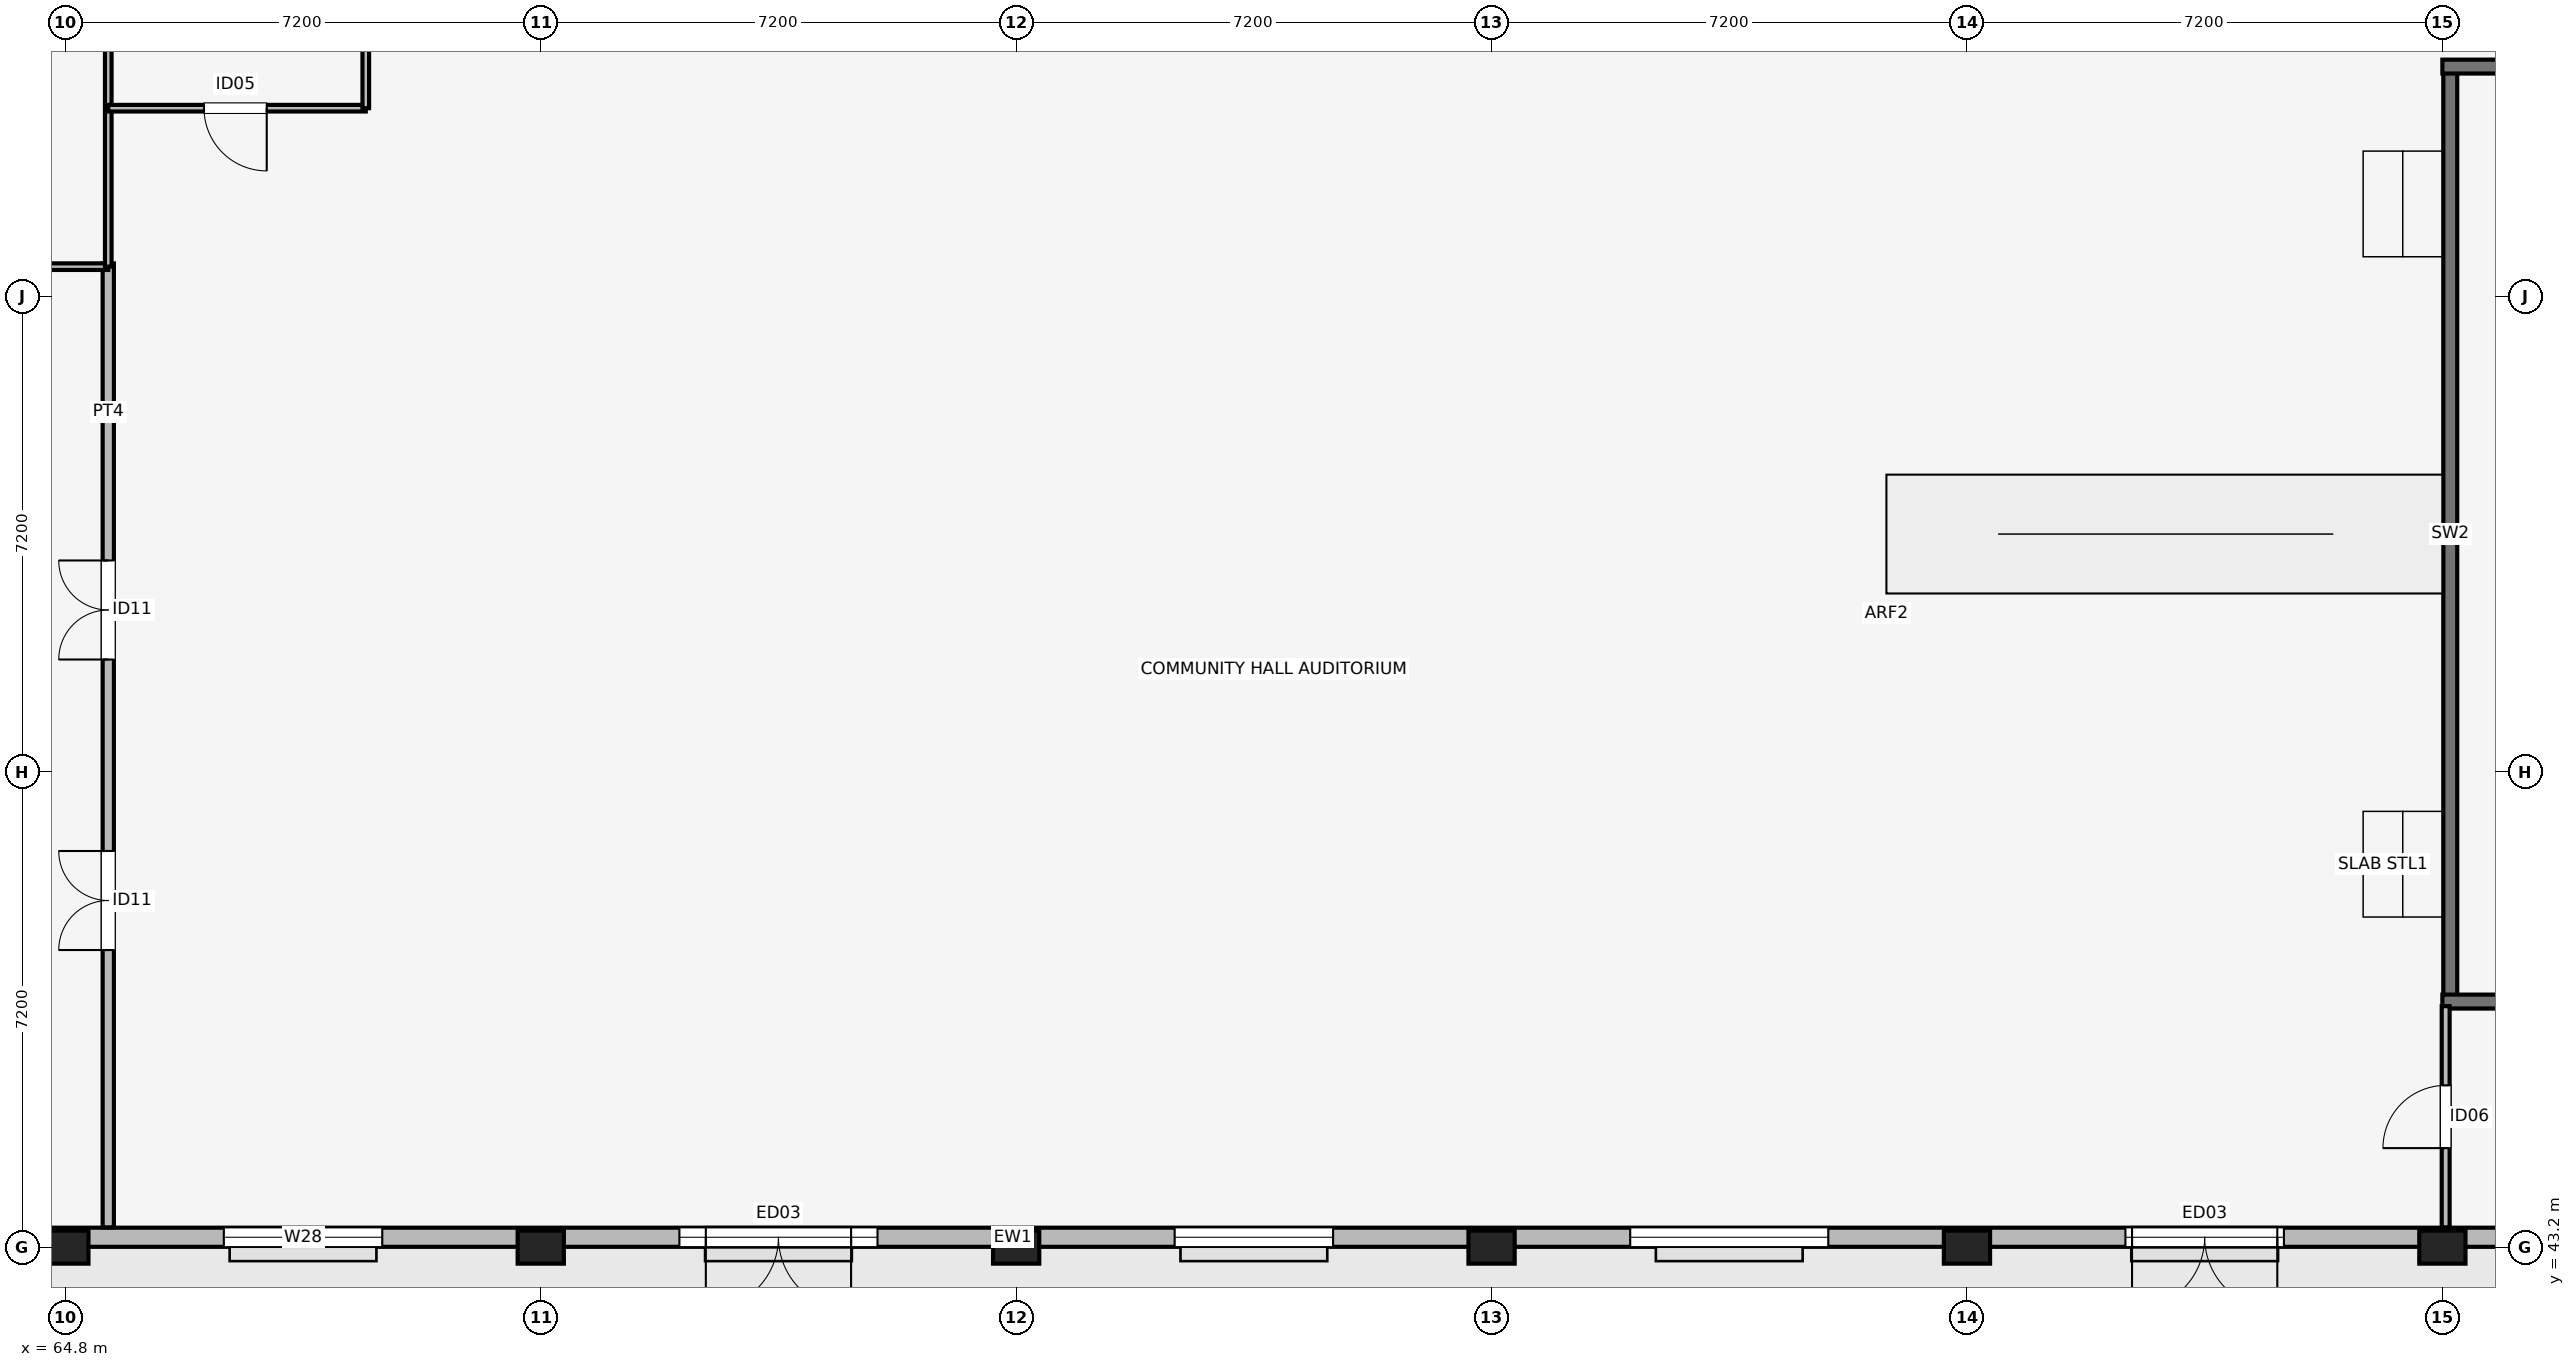
"""IFC4 building model, lengths in metres.
Left out: names, types, materials, properties, quantities, classifications, styles, units other than length and angle.
Written with IfcOpenShell. Run it as: python <this file> out.ifc"""

import sys

from ifc_helpers import new_model, si_unit, direction, frame, frame_2d, origin, origin_2d, place, context, subcontext, project, spatial, rectangle, extrude, element, fill, save


model = new_model("IFC4")
c1 = context("Model", 3, precision=1e-05, world=origin(), true_north=direction((0.0, 1.0)))
c2 = subcontext(c1, "Body", "Model", "MODEL_VIEW")
j1 = project(units=[si_unit("LENGTHUNIT", "METRE"), si_unit("PLANEANGLEUNIT", "RADIAN")], contexts=[c1])
p1 = place(None, origin())
s1 = spatial("IfcSite", under=j1, at=p1, CompositionType="ELEMENT")
p2 = place(p1, origin())
s2 = spatial("IfcBuilding", under=s1, at=p2, CompositionType="ELEMENT")
p3 = place(p2, origin())
s3 = spatial("IfcBuildingStorey", under=s2, at=p3, CompositionType="ELEMENT", Elevation=0.0)
p4 = place(p3, frame((100.92, 46.9, 0.0), z_axis=(0.0, 0.0, 1.0), x_axis=(0.0, 1.0, 0.0)))
e1 = element("IfcWall", 1, at=p4, inside=s3, PredefinedType="SHEAR", context=c2, shape_type="SweptSolid", body=[
    extrude(rectangle(XDim=14.2, YDim=0.21, at=frame_2d((7.1, 0.0))), origin(), (0.0, 0.0, 1.0), 0.26),
])
for number, where, z_axis, x_axis in (
    (2, (100.8, 46.92, 0.0), (0.0, 0.0, 1.0), (1.0, 0.0, 0.0)),
    (3, (100.8, 61.08, 0.0), (0.0, 0.0, 1.0), (1.0, 0.0, 0.0)),
):
    element("IfcWall", number, at=place(p3, frame(where, z_axis=z_axis, x_axis=x_axis)), inside=s3, PredefinedType="SHEAR", context=c2, shape_type="SweptSolid", body=[
        extrude(rectangle(XDim=6.92, YDim=0.21, at=frame_2d((3.46, 0.0))), origin(), (0.0, 0.0, 1.0), 0.26),
    ])
for number, where, z_axis, x_axis in (
    (4, (64.8, 43.2, 0.0), (0.0, 0.0, 1.0), (0.0, 1.0, 0.0)),
    (5, (72.0, 43.2, 0.0), (0.0, 0.0, 1.0), (0.0, 1.0, 0.0)),
    (6, (79.2, 43.2, 0.0), (0.0, 0.0, 1.0), (0.0, 1.0, 0.0)),
    (7, (86.4, 43.2, 0.0), (0.0, 0.0, 1.0), (0.0, 1.0, 0.0)),
    (8, (93.6, 43.2, 0.0), (0.0, 0.0, 1.0), (0.0, 1.0, 0.0)),
    (9, (100.8, 43.2, 0.0), (0.0, 0.0, 1.0), (0.0, 1.0, 0.0)),
):
    element("IfcColumn", number, at=place(p3, frame(where, z_axis=z_axis, x_axis=x_axis)), inside=s3, PredefinedType="COLUMN", context=c2, shape_type="SweptSolid", body=[
        extrude(rectangle(XDim=0.5, YDim=0.7, at=origin_2d()), origin(), (0.0, 0.0, 1.0), 4.8),
    ])
p5 = place(p3, frame((59.0, 43.35, 0.0), z_axis=(0.0, 0.0, 1.0), x_axis=(1.0, 0.0, 0.0)))
e10 = element("IfcWall", 10, at=p5, inside=s3, PredefinedType="SOLIDWALL", context=c2, shape_type="SweptSolid", body=[
    extrude(rectangle(XDim=47.6, YDim=0.29, at=frame_2d((23.8, 0.0))), origin(), (0.0, 0.0, 1.0), 3.88),
])
p6 = place(p5, frame((3.3, 0.0, 0.0), z_axis=(0.0, 0.0, 1.0), x_axis=(-1.0, 0.0, 0.0)))
e11 = element("IfcOpeningElement", 11, at=p6, cuts=e10, PredefinedType="OPENING", context=c2, shape_type="SweptSolid", body=[
    extrude(rectangle(XDim=2.2, YDim=2.6, at=frame_2d((1.1, 1.3))), frame((0.0, 0.155, 0.0), z_axis=(0.0, -1.0, 0.0), x_axis=(1.0, 0.0, 0.0)), (0.0, 0.0, 1.0), 0.31),
])
p7 = place(p5, frame((17.7, 0.0, 0.0), z_axis=(0.0, 0.0, 1.0), x_axis=(-1.0, 0.0, 0.0)))
e12 = element("IfcOpeningElement", 12, at=p7, cuts=e10, PredefinedType="OPENING", context=c2, shape_type="SweptSolid", body=[
    extrude(rectangle(XDim=2.2, YDim=2.6, at=frame_2d((1.1, 1.3))), frame((0.0, 0.155, 0.0), z_axis=(0.0, -1.0, 0.0), x_axis=(1.0, 0.0, 0.0)), (0.0, 0.0, 1.0), 0.31),
])
p8 = place(p5, frame((39.3, 0.0, 0.0), z_axis=(0.0, 0.0, 1.0), x_axis=(-1.0, 0.0, 0.0)))
e13 = element("IfcOpeningElement", 13, at=p8, cuts=e10, PredefinedType="OPENING", context=c2, shape_type="SweptSolid", body=[
    extrude(rectangle(XDim=2.2, YDim=2.6, at=frame_2d((1.1, 1.3))), frame((0.0, 0.155, 0.0), z_axis=(0.0, -1.0, 0.0), x_axis=(1.0, 0.0, 0.0)), (0.0, 0.0, 1.0), 0.31),
])
p9 = place(p5, frame((0.7, 0.0, 2.85)))
e14 = element("IfcOpeningElement", 14, at=p9, cuts=e10, PredefinedType="OPENING", context=c2, shape_type="SweptSolid", body=[
    extrude(rectangle(XDim=3.0, YDim=0.9, at=frame_2d((1.5, 0.45))), frame((0.0, 0.155, 0.0), z_axis=(0.0, -1.0, 0.0), x_axis=(1.0, 0.0, 0.0)), (0.0, 0.0, 1.0), 0.31),
])
p10 = place(p5, frame((8.2, 0.0, 2.85)))
e15 = element("IfcOpeningElement", 15, at=p10, cuts=e10, PredefinedType="OPENING", context=c2, shape_type="SweptSolid", body=[
    extrude(rectangle(XDim=2.4, YDim=0.9, at=frame_2d((1.2, 0.45))), frame((0.0, 0.155, 0.0), z_axis=(0.0, -1.0, 0.0), x_axis=(1.0, 0.0, 0.0)), (0.0, 0.0, 1.0), 0.31),
])
p11 = place(p5, frame((15.1, 0.0, 2.85)))
e16 = element("IfcOpeningElement", 16, at=p11, cuts=e10, PredefinedType="OPENING", context=c2, shape_type="SweptSolid", body=[
    extrude(rectangle(XDim=3.0, YDim=0.9, at=frame_2d((1.5, 0.45))), frame((0.0, 0.155, 0.0), z_axis=(0.0, -1.0, 0.0), x_axis=(1.0, 0.0, 0.0)), (0.0, 0.0, 1.0), 0.31),
])
p12 = place(p5, frame((22.6, 0.0, 2.85)))
e17 = element("IfcOpeningElement", 17, at=p12, cuts=e10, PredefinedType="OPENING", context=c2, shape_type="SweptSolid", body=[
    extrude(rectangle(XDim=2.4, YDim=0.9, at=frame_2d((1.2, 0.45))), frame((0.0, 0.155, 0.0), z_axis=(0.0, -1.0, 0.0), x_axis=(1.0, 0.0, 0.0)), (0.0, 0.0, 1.0), 0.31),
])
p13 = place(p5, frame((29.5, 0.0, 2.85)))
e18 = element("IfcOpeningElement", 18, at=p13, cuts=e10, PredefinedType="OPENING", context=c2, shape_type="SweptSolid", body=[
    extrude(rectangle(XDim=3.0, YDim=0.9, at=frame_2d((1.5, 0.45))), frame((0.0, 0.155, 0.0), z_axis=(0.0, -1.0, 0.0), x_axis=(1.0, 0.0, 0.0)), (0.0, 0.0, 1.0), 0.31),
])
p14 = place(p5, frame((37.0, 0.0, 2.85)))
e19 = element("IfcOpeningElement", 19, at=p14, cuts=e10, PredefinedType="OPENING", context=c2, shape_type="SweptSolid", body=[
    extrude(rectangle(XDim=2.4, YDim=0.9, at=frame_2d((1.2, 0.45))), frame((0.0, 0.155, 0.0), z_axis=(0.0, -1.0, 0.0), x_axis=(1.0, 0.0, 0.0)), (0.0, 0.0, 1.0), 0.31),
])
p15 = place(p5, frame((43.9, 0.0, 2.85)))
e20 = element("IfcOpeningElement", 20, at=p15, cuts=e10, PredefinedType="OPENING", context=c2, shape_type="SweptSolid", body=[
    extrude(rectangle(XDim=3.0, YDim=0.9, at=frame_2d((1.5, 0.45))), frame((0.0, 0.155, 0.0), z_axis=(0.0, -1.0, 0.0), x_axis=(1.0, 0.0, 0.0)), (0.0, 0.0, 1.0), 0.31),
])
p16 = place(p3, frame((65.45, 43.5, 0.0), z_axis=(0.0, 0.0, 1.0), x_axis=(0.0, 1.0, 0.0)))
e21 = element("IfcWall", 21, at=p16, inside=s3, PredefinedType="PARTITIONING", context=c2, shape_type="SweptSolid", body=[
    extrude(rectangle(XDim=14.6, YDim=0.17, at=frame_2d((7.3, 0.0))), origin(), (0.0, 0.0, 1.0), 3.8),
])
p17 = place(p16, frame((4.2, 0.0, 0.0)))
e22 = element("IfcOpeningElement", 22, at=p17, cuts=e21, PredefinedType="OPENING", context=c2, shape_type="SweptSolid", body=[
    extrude(rectangle(XDim=1.5, YDim=2.28, at=frame_2d((0.75, 1.14))), frame((0.0, 0.095, 0.0), z_axis=(0.0, -1.0, 0.0), x_axis=(1.0, 0.0, 0.0)), (0.0, 0.0, 1.0), 0.19),
])
p18 = place(p16, frame((8.6, 0.0, 0.0)))
e23 = element("IfcOpeningElement", 23, at=p18, cuts=e21, PredefinedType="OPENING", context=c2, shape_type="SweptSolid", body=[
    extrude(rectangle(XDim=1.5, YDim=2.28, at=frame_2d((0.75, 1.14))), frame((0.0, 0.095, 0.0), z_axis=(0.0, -1.0, 0.0), x_axis=(1.0, 0.0, 0.0)), (0.0, 0.0, 1.0), 0.19),
])
p19 = place(p3, frame((57.9, 58.05, 0.0), z_axis=(0.0, 0.0, 1.0), x_axis=(1.0, 0.0, 0.0)))
e24 = element("IfcWall", 24, at=p19, inside=s3, PredefinedType="PARTITIONING", context=c2, shape_type="SweptSolid", body=[
    extrude(rectangle(XDim=7.55, YDim=0.1, at=frame_2d((3.775, 0.0))), origin(), (0.0, 0.0, 1.0), 3.8),
])
p20 = place(p19, frame((2.27, 0.0, 0.0), z_axis=(0.0, 0.0, 1.0), x_axis=(-1.0, 0.0, 0.0)))
e25 = element("IfcOpeningElement", 25, at=p20, cuts=e24, PredefinedType="OPENING", context=c2, shape_type="SweptSolid", body=[
    extrude(rectangle(XDim=0.92, YDim=2.12, at=frame_2d((0.46, 1.06))), frame((0.0, 0.06, 0.0), z_axis=(0.0, -1.0, 0.0), x_axis=(1.0, 0.0, 0.0)), (0.0, 0.0, 1.0), 0.12),
])
p21 = place(p19, frame((5.05, 0.0, 0.0)))
e26 = element("IfcOpeningElement", 26, at=p21, cuts=e24, PredefinedType="OPENING", context=c2, shape_type="SweptSolid", body=[
    extrude(rectangle(XDim=0.92, YDim=2.12, at=frame_2d((0.46, 1.06))), frame((0.0, 0.06, 0.0), z_axis=(0.0, -1.0, 0.0), x_axis=(1.0, 0.0, 0.0)), (0.0, 0.0, 1.0), 0.12),
])
p22 = place(p3, frame((65.45, 58.05, 0.0), z_axis=(0.0, 0.0, 1.0), x_axis=(0.0, 1.0, 0.0)))
e27 = element("IfcWall", 27, at=p22, inside=s3, PredefinedType="PARTITIONING", context=c2, shape_type="SweptSolid", body=[
    extrude(rectangle(XDim=6.45, YDim=0.1, at=frame_2d((3.225, 0.0))), origin(), (0.0, 0.0, 1.0), 3.8),
])
p23 = place(p3, frame((65.45, 60.45, 0.0), z_axis=(0.0, 0.0, 1.0), x_axis=(1.0, 0.0, 0.0)))
e28 = element("IfcWall", 28, at=p23, inside=s3, PredefinedType="PARTITIONING", context=c2, shape_type="SweptSolid", body=[
    extrude(rectangle(XDim=3.9, YDim=0.1, at=frame_2d((1.95, 0.0))), origin(), (0.0, 0.0, 1.0), 3.8),
])
p24 = place(p23, frame((2.4, 0.0, 0.0), z_axis=(0.0, 0.0, 1.0), x_axis=(-1.0, 0.0, 0.0)))
e29 = element("IfcOpeningElement", 29, at=p24, cuts=e28, PredefinedType="OPENING", context=c2, shape_type="SweptSolid", body=[
    extrude(rectangle(XDim=0.95, YDim=2.12, at=frame_2d((0.475, 1.06))), frame((0.0, 0.06, 0.0), z_axis=(0.0, -1.0, 0.0), x_axis=(1.0, 0.0, 0.0)), (0.0, 0.0, 1.0), 0.12),
])
p25 = place(p3, frame((69.35, 60.45, 0.0), z_axis=(0.0, 0.0, 1.0), x_axis=(0.0, 1.0, 0.0)))
e30 = element("IfcWall", 30, at=p25, inside=s3, PredefinedType="PARTITIONING", context=c2, shape_type="SweptSolid", body=[
    extrude(rectangle(XDim=4.05, YDim=0.1, at=frame_2d((2.025, 0.0))), origin(), (0.0, 0.0, 1.0), 3.8),
])
p26 = place(p3, frame((100.85, 43.5, 0.0), z_axis=(0.0, 0.0, 1.0), x_axis=(0.0, 1.0, 0.0)))
e31 = element("IfcWall", 31, at=p26, inside=s3, PredefinedType="PARTITIONING", context=c2, shape_type="SweptSolid", body=[
    extrude(rectangle(XDim=3.35, YDim=0.12, at=frame_2d((1.675, 0.0))), origin(), (0.0, 0.0, 1.0), 3.8),
])
p27 = place(p26, frame((1.2, 0.0, 0.0)))
e32 = element("IfcOpeningElement", 32, at=p27, cuts=e31, PredefinedType="OPENING", context=c2, shape_type="SweptSolid", body=[
    extrude(rectangle(XDim=0.95, YDim=2.08, at=frame_2d((0.475, 1.04))), frame((0.0, 0.07, 0.0), z_axis=(0.0, -1.0, 0.0), x_axis=(1.0, 0.0, 0.0)), (0.0, 0.0, 1.0), 0.14),
])
p28 = place(p7, origin())
e33 = element("IfcDoor", 33, at=p28, inside=s3, OperationType="DOUBLE_DOOR_SINGLE_SWING", PredefinedType="DOOR", context=c2, shape_type="SweptSolid", body=[
    extrude(rectangle(XDim=2.2, YDim=2.6, at=frame_2d((1.1, 1.3))), frame((0.0, 0.025, 0.0), z_axis=(0.0, -1.0, 0.0), x_axis=(1.0, 0.0, 0.0)), (0.0, 0.0, 1.0), 0.05),
])
fill(e12, e33)
p29 = place(p8, origin())
e34 = element("IfcDoor", 34, at=p29, inside=s3, OperationType="DOUBLE_DOOR_SINGLE_SWING", PredefinedType="DOOR", context=c2, shape_type="SweptSolid", body=[
    extrude(rectangle(XDim=2.2, YDim=2.6, at=frame_2d((1.1, 1.3))), frame((0.0, 0.025, 0.0), z_axis=(0.0, -1.0, 0.0), x_axis=(1.0, 0.0, 0.0)), (0.0, 0.0, 1.0), 0.05),
])
fill(e13, e34)
p30 = place(p10, origin())
e35 = element("IfcWindow", 35, at=p30, inside=s3, PartitioningType="SINGLE_PANEL", PredefinedType="WINDOW", context=c2, shape_type="SweptSolid", body=[
    extrude(rectangle(XDim=2.4, YDim=0.9, at=frame_2d((1.2, 0.45))), frame((0.0, 0.03, 0.0), z_axis=(0.0, -1.0, 0.0), x_axis=(1.0, 0.0, 0.0)), (0.0, 0.0, 1.0), 0.06),
])
fill(e15, e35)
p31 = place(p11, origin())
e36 = element("IfcWindow", 36, at=p31, inside=s3, PartitioningType="SINGLE_PANEL", PredefinedType="WINDOW", context=c2, shape_type="SweptSolid", body=[
    extrude(rectangle(XDim=3.0, YDim=0.9, at=frame_2d((1.5, 0.45))), frame((0.0, 0.03, 0.0), z_axis=(0.0, -1.0, 0.0), x_axis=(1.0, 0.0, 0.0)), (0.0, 0.0, 1.0), 0.06),
])
fill(e16, e36)
p32 = place(p12, origin())
e37 = element("IfcWindow", 37, at=p32, inside=s3, PartitioningType="SINGLE_PANEL", PredefinedType="WINDOW", context=c2, shape_type="SweptSolid", body=[
    extrude(rectangle(XDim=2.4, YDim=0.9, at=frame_2d((1.2, 0.45))), frame((0.0, 0.03, 0.0), z_axis=(0.0, -1.0, 0.0), x_axis=(1.0, 0.0, 0.0)), (0.0, 0.0, 1.0), 0.06),
])
fill(e17, e37)
p33 = place(p13, origin())
e38 = element("IfcWindow", 38, at=p33, inside=s3, PartitioningType="SINGLE_PANEL", PredefinedType="WINDOW", context=c2, shape_type="SweptSolid", body=[
    extrude(rectangle(XDim=3.0, YDim=0.9, at=frame_2d((1.5, 0.45))), frame((0.0, 0.03, 0.0), z_axis=(0.0, -1.0, 0.0), x_axis=(1.0, 0.0, 0.0)), (0.0, 0.0, 1.0), 0.06),
])
fill(e18, e38)
p34 = place(p14, origin())
e39 = element("IfcWindow", 39, at=p34, inside=s3, PartitioningType="SINGLE_PANEL", PredefinedType="WINDOW", context=c2, shape_type="SweptSolid", body=[
    extrude(rectangle(XDim=2.4, YDim=0.9, at=frame_2d((1.2, 0.45))), frame((0.0, 0.03, 0.0), z_axis=(0.0, -1.0, 0.0), x_axis=(1.0, 0.0, 0.0)), (0.0, 0.0, 1.0), 0.06),
])
fill(e19, e39)
p35 = place(p17, origin())
e40 = element("IfcDoor", 40, at=p35, inside=s3, OperationType="DOUBLE_DOOR_SINGLE_SWING", PredefinedType="DOOR", context=c2, shape_type="SweptSolid", body=[
    extrude(rectangle(XDim=1.5, YDim=2.28, at=frame_2d((0.75, 1.14))), frame((0.0, 0.025, 0.0), z_axis=(0.0, -1.0, 0.0), x_axis=(1.0, 0.0, 0.0)), (0.0, 0.0, 1.0), 0.05),
])
fill(e22, e40)
p36 = place(p18, origin())
e41 = element("IfcDoor", 41, at=p36, inside=s3, OperationType="DOUBLE_DOOR_SINGLE_SWING", PredefinedType="DOOR", context=c2, shape_type="SweptSolid", body=[
    extrude(rectangle(XDim=1.5, YDim=2.28, at=frame_2d((0.75, 1.14))), frame((0.0, 0.025, 0.0), z_axis=(0.0, -1.0, 0.0), x_axis=(1.0, 0.0, 0.0)), (0.0, 0.0, 1.0), 0.05),
])
fill(e23, e41)
p37 = place(p24, origin())
e42 = element("IfcDoor", 42, at=p37, inside=s3, OperationType="SINGLE_SWING_RIGHT", PredefinedType="DOOR", context=c2, shape_type="SweptSolid", body=[
    extrude(rectangle(XDim=0.95, YDim=2.12, at=frame_2d((0.475, 1.06))), frame((0.0, 0.025, 0.0), z_axis=(0.0, -1.0, 0.0), x_axis=(1.0, 0.0, 0.0)), (0.0, 0.0, 1.0), 0.05),
])
fill(e29, e42)
p38 = place(p27, origin())
e43 = element("IfcDoor", 43, at=p38, inside=s3, OperationType="SINGLE_SWING_LEFT", PredefinedType="DOOR", context=c2, shape_type="SweptSolid", body=[
    extrude(rectangle(XDim=0.95, YDim=2.08, at=frame_2d((0.475, 1.04))), frame((0.0, 0.025, 0.0), z_axis=(0.0, -1.0, 0.0), x_axis=(1.0, 0.0, 0.0)), (0.0, 0.0, 1.0), 0.05),
])
fill(e32, e43)
save(model, sys.argv[1])
